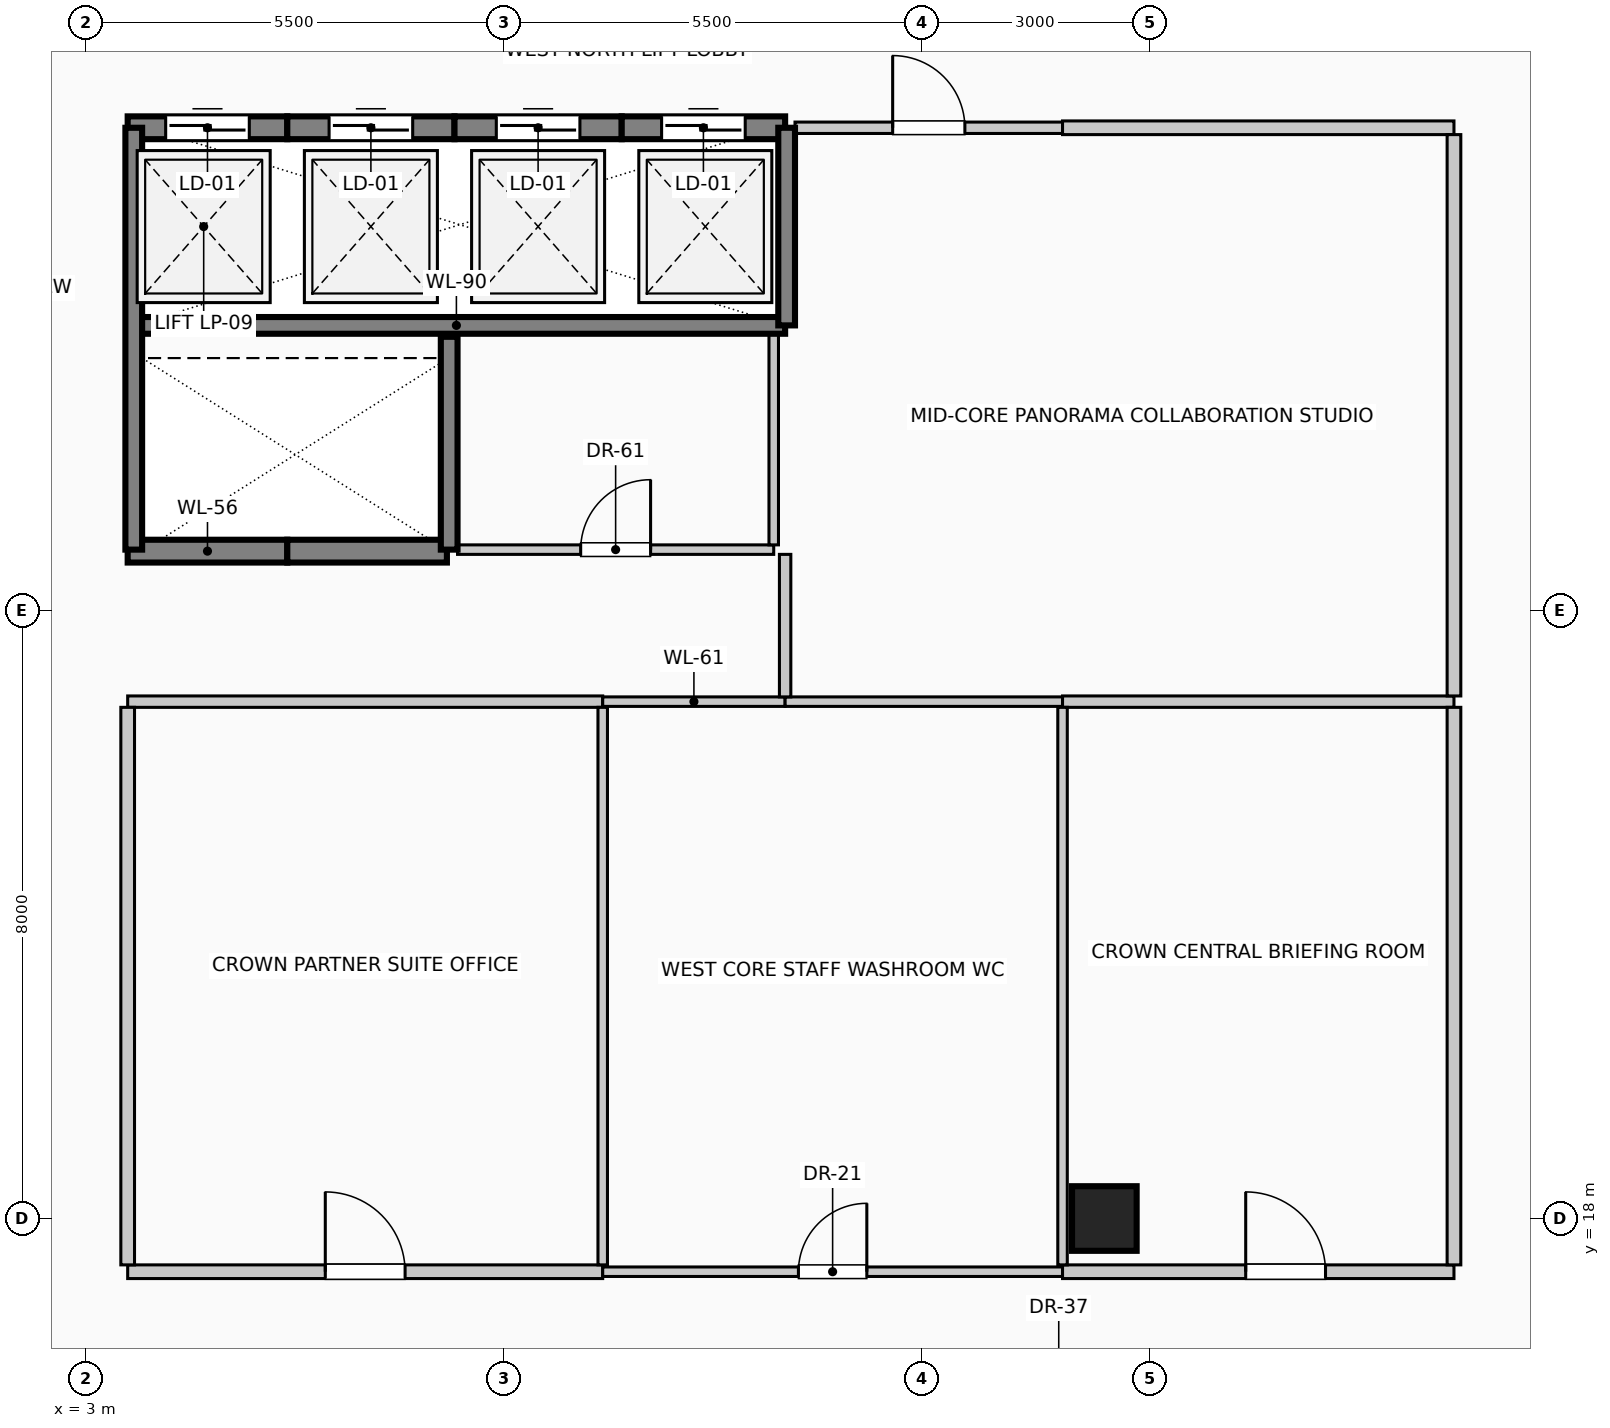
"""IFC4 building model, lengths in metres.
Left out: names, types, materials, properties, quantities, classifications, styles, units other than length and angle.
Written with IfcOpenShell. Run it as: python <this file> out.ifc"""

import sys

from ifc_helpers import new_model, si_unit, direction, frame, frame_2d, origin, origin_2d, place, context, subcontext, project, spatial, rectangle, circle, extrude, element, fill, save


model = new_model("IFC4")
c1 = context("Model", 3, precision=1e-05, world=origin(), true_north=direction((0.0, 1.0)))
c2 = subcontext(c1, "Body", "Model", "MODEL_VIEW")
j1 = project(units=[si_unit("LENGTHUNIT", "METRE"), si_unit("PLANEANGLEUNIT", "RADIAN")], contexts=[c1])
p1 = place(None, origin())
s1 = spatial("IfcSite", under=j1, at=p1, CompositionType="ELEMENT")
p2 = place(p1, origin())
s2 = spatial("IfcBuilding", under=s1, at=p2, CompositionType="ELEMENT")
p3 = place(p2, frame((0.0, 0.0, 301.0)))
s3 = spatial("IfcBuildingStorey", under=s2, at=p3, CompositionType="ELEMENT", Elevation=301.0)
p4 = place(p3, frame((16.4, 18.0, 0.0), z_axis=(0.0, 0.0, 1.0), x_axis=(1.0, 0.0, 0.0)))
e1 = element("IfcColumn", 1, at=p4, inside=s3, PredefinedType="COLUMN", context=c2, shape_type="SweptSolid", body=[
    extrude(circle(Radius=0.425, at=origin_2d()), origin(), (0.0, 0.0, 1.0), 4.0),
])
p5 = place(p3, frame((3.55, 32.35, 0.0), z_axis=(0.0, 0.0, 1.0), x_axis=(1.0, 0.0, 0.0)))
e2 = element("IfcWall", 2, at=p5, inside=s3, PredefinedType="SOLIDWALL", context=c2, shape_type="SweptSolid", body=[
    extrude(rectangle(XDim=2.1, YDim=0.3, at=frame_2d((1.05, 0.0))), origin(), (0.0, 0.0, 1.0), 4.0),
])
p6 = place(p5, frame((0.5, 0.0, 0.0)))
e3 = element("IfcOpeningElement", 3, at=p6, cuts=e2, PredefinedType="OPENING", context=c2, shape_type="SweptSolid", body=[
    extrude(rectangle(XDim=1.1, YDim=2.2, at=frame_2d((0.55, 1.1))), frame((0.0, 0.16, 0.0), z_axis=(0.0, -1.0, 0.0), x_axis=(1.0, 0.0, 0.0)), (0.0, 0.0, 1.0), 0.32),
])
p7 = place(p3, frame((5.65, 32.35, 0.0), z_axis=(0.0, 0.0, 1.0), x_axis=(1.0, 0.0, 0.0)))
e4 = element("IfcWall", 4, at=p7, inside=s3, PredefinedType="SOLIDWALL", context=c2, shape_type="SweptSolid", body=[
    extrude(rectangle(XDim=2.2, YDim=0.3, at=frame_2d((1.1, 0.0))), origin(), (0.0, 0.0, 1.0), 4.0),
])
p8 = place(p7, frame((0.55, 0.0, 0.0)))
e5 = element("IfcOpeningElement", 5, at=p8, cuts=e4, PredefinedType="OPENING", context=c2, shape_type="SweptSolid", body=[
    extrude(rectangle(XDim=1.1, YDim=2.2, at=frame_2d((0.55, 1.1))), frame((0.0, 0.16, 0.0), z_axis=(0.0, -1.0, 0.0), x_axis=(1.0, 0.0, 0.0)), (0.0, 0.0, 1.0), 0.32),
])
p9 = place(p3, frame((7.85, 32.35, 0.0), z_axis=(0.0, 0.0, 1.0), x_axis=(1.0, 0.0, 0.0)))
e6 = element("IfcWall", 6, at=p9, inside=s3, PredefinedType="SOLIDWALL", context=c2, shape_type="SweptSolid", body=[
    extrude(rectangle(XDim=2.2, YDim=0.3, at=frame_2d((1.1, 0.0))), origin(), (0.0, 0.0, 1.0), 4.0),
])
p10 = place(p9, frame((0.55, 0.0, 0.0)))
e7 = element("IfcOpeningElement", 7, at=p10, cuts=e6, PredefinedType="OPENING", context=c2, shape_type="SweptSolid", body=[
    extrude(rectangle(XDim=1.1, YDim=2.2, at=frame_2d((0.55, 1.1))), frame((0.0, 0.16, 0.0), z_axis=(0.0, -1.0, 0.0), x_axis=(1.0, 0.0, 0.0)), (0.0, 0.0, 1.0), 0.32),
])
p11 = place(p3, frame((10.05, 32.35, 0.0), z_axis=(0.0, 0.0, 1.0), x_axis=(1.0, 0.0, 0.0)))
e8 = element("IfcWall", 8, at=p11, inside=s3, PredefinedType="SOLIDWALL", context=c2, shape_type="SweptSolid", body=[
    extrude(rectangle(XDim=2.15, YDim=0.3, at=frame_2d((1.075, 0.0))), origin(), (0.0, 0.0, 1.0), 4.0),
])
p12 = place(p11, frame((0.525, 0.0, 0.0)))
e9 = element("IfcOpeningElement", 9, at=p12, cuts=e8, PredefinedType="OPENING", context=c2, shape_type="SweptSolid", body=[
    extrude(rectangle(XDim=1.1, YDim=2.2, at=frame_2d((0.55, 1.1))), frame((0.0, 0.16, 0.0), z_axis=(0.0, -1.0, 0.0), x_axis=(1.0, 0.0, 0.0)), (0.0, 0.0, 1.0), 0.32),
])
p13 = place(p3, frame((5.65, 26.78, 0.0), z_axis=(0.0, 0.0, 1.0), x_axis=(-1.0, 0.0, 0.0)))
e10 = element("IfcWall", 10, at=p13, inside=s3, PredefinedType="SOLIDWALL", context=c2, shape_type="SweptSolid", body=[
    extrude(rectangle(XDim=2.1, YDim=0.3, at=frame_2d((1.05, 0.0))), origin(), (0.0, 0.0, 1.0), 4.0),
])
p14 = place(p3, frame((7.75, 26.78, 0.0), z_axis=(0.0, 0.0, 1.0), x_axis=(-1.0, 0.0, 0.0)))
e11 = element("IfcWall", 11, at=p14, inside=s3, PredefinedType="SOLIDWALL", context=c2, shape_type="SweptSolid", body=[
    extrude(rectangle(XDim=2.1, YDim=0.3, at=frame_2d((1.05, 0.0))), origin(), (0.0, 0.0, 1.0), 4.0),
])
p15 = place(p3, frame((3.55, 29.75, 0.0), z_axis=(0.0, 0.0, 1.0), x_axis=(1.0, 0.0, 0.0)))
e12 = element("IfcWall", 12, at=p15, inside=s3, PredefinedType="SOLIDWALL", context=c2, shape_type="SweptSolid", body=[
    extrude(rectangle(XDim=8.65, YDim=0.22, at=frame_2d((4.325, 0.0))), origin(), (0.0, 0.0, 1.0), 4.0),
])
p16 = place(p3, frame((3.63, 26.8, 0.0), z_axis=(0.0, 0.0, 1.0), x_axis=(0.0, 1.0, 0.0)))
e13 = element("IfcWall", 13, at=p16, inside=s3, PredefinedType="SOLIDWALL", context=c2, shape_type="SweptSolid", body=[
    extrude(rectangle(XDim=5.55, YDim=0.22, at=frame_2d((2.775, 0.0))), origin(), (0.0, 0.0, 1.0), 4.0),
])
p17 = place(p3, frame((7.78, 26.8, 0.0), z_axis=(0.0, 0.0, 1.0), x_axis=(0.0, 1.0, 0.0)))
e14 = element("IfcWall", 14, at=p17, inside=s3, PredefinedType="SOLIDWALL", context=c2, shape_type="SweptSolid", body=[
    extrude(rectangle(XDim=2.8, YDim=0.22, at=frame_2d((1.4, 0.0))), origin(), (0.0, 0.0, 1.0), 4.0),
])
p18 = place(p3, frame((12.22, 29.75, 0.0), z_axis=(0.0, 0.0, 1.0), x_axis=(0.0, 1.0, 0.0)))
e15 = element("IfcWall", 15, at=p18, inside=s3, PredefinedType="SOLIDWALL", context=c2, shape_type="SweptSolid", body=[
    extrude(rectangle(XDim=2.6, YDim=0.22, at=frame_2d((1.3, 0.0))), origin(), (0.0, 0.0, 1.0), 4.0),
])
p19 = place(p3, frame((3.55, 17.3, 0.0), z_axis=(0.0, 0.0, 1.0), x_axis=(1.0, 0.0, 0.0)))
e16 = element("IfcWall", 16, at=p19, inside=s3, PredefinedType="PARTITIONING", context=c2, shape_type="SweptSolid", body=[
    extrude(rectangle(XDim=6.25, YDim=0.18, at=frame_2d((3.125, 0.0))), origin(), (0.0, 0.0, 1.0), 3.775),
])
p20 = place(p19, frame((2.6, 0.0, 0.0)))
e17 = element("IfcOpeningElement", 17, at=p20, cuts=e16, PredefinedType="OPENING", context=c2, shape_type="SweptSolid", body=[
    extrude(rectangle(XDim=1.05, YDim=2.15, at=frame_2d((0.525, 1.075))), frame((0.0, 0.1, 0.0), z_axis=(0.0, -1.0, 0.0), x_axis=(1.0, 0.0, 0.0)), (0.0, 0.0, 1.0), 0.2),
])
p21 = place(p3, frame((9.8, 17.3, 0.0), z_axis=(0.0, 0.0, 1.0), x_axis=(1.0, 0.0, 0.0)))
e18 = element("IfcWall", 18, at=p21, inside=s3, PredefinedType="PARTITIONING", context=c2, shape_type="SweptSolid", body=[
    extrude(rectangle(XDim=6.05, YDim=0.125, at=frame_2d((3.025, 0.0))), origin(), (0.0, 0.0, 1.0), 3.775),
])
p22 = place(p21, frame((2.575, 0.0, 0.0)))
e19 = element("IfcOpeningElement", 19, at=p22, cuts=e18, PredefinedType="OPENING", context=c2, shape_type="SweptSolid", body=[
    extrude(rectangle(XDim=0.9, YDim=2.1, at=frame_2d((0.45, 1.05))), frame((0.0, 0.073, 0.0), z_axis=(0.0, -1.0, 0.0), x_axis=(1.0, 0.0, 0.0)), (0.0, 0.0, 1.0), 0.145),
])
p23 = place(p3, frame((15.85, 17.3, 0.0), z_axis=(0.0, 0.0, 1.0), x_axis=(1.0, 0.0, 0.0)))
e20 = element("IfcWall", 20, at=p23, inside=s3, PredefinedType="PARTITIONING", context=c2, shape_type="SweptSolid", body=[
    extrude(rectangle(XDim=5.15, YDim=0.18, at=frame_2d((2.575, 0.0))), origin(), (0.0, 0.0, 1.0), 3.775),
])
p24 = place(p23, frame((2.41, 0.0, 0.0)))
e21 = element("IfcOpeningElement", 21, at=p24, cuts=e20, PredefinedType="OPENING", context=c2, shape_type="SweptSolid", body=[
    extrude(rectangle(XDim=1.05, YDim=2.15, at=frame_2d((0.525, 1.075))), frame((0.0, 0.1, 0.0), z_axis=(0.0, -1.0, 0.0), x_axis=(1.0, 0.0, 0.0)), (0.0, 0.0, 1.0), 0.2),
])
p25 = place(p3, frame((3.55, 24.8, 0.0), z_axis=(0.0, 0.0, 1.0), x_axis=(1.0, 0.0, 0.0)))
e22 = element("IfcWall", 22, at=p25, inside=s3, PredefinedType="PARTITIONING", context=c2, shape_type="SweptSolid", body=[
    extrude(rectangle(XDim=6.25, YDim=0.15, at=frame_2d((3.125, 0.0))), origin(), (0.0, 0.0, 1.0), 3.775),
])
p26 = place(p3, frame((9.8, 24.8, 0.0), z_axis=(0.0, 0.0, 1.0), x_axis=(1.0, 0.0, 0.0)))
e23 = element("IfcWall", 23, at=p26, inside=s3, PredefinedType="PARTITIONING", context=c2, shape_type="SweptSolid", body=[
    extrude(rectangle(XDim=2.4, YDim=0.125, at=frame_2d((1.2, 0.0))), origin(), (0.0, 0.0, 1.0), 3.775),
])
p27 = place(p3, frame((12.2, 24.8, 0.0), z_axis=(0.0, 0.0, 1.0), x_axis=(1.0, 0.0, 0.0)))
e24 = element("IfcWall", 24, at=p27, inside=s3, PredefinedType="PARTITIONING", context=c2, shape_type="SweptSolid", body=[
    extrude(rectangle(XDim=3.65, YDim=0.125, at=frame_2d((1.825, 0.0))), origin(), (0.0, 0.0, 1.0), 3.775),
])
p28 = place(p3, frame((15.85, 24.8, 0.0), z_axis=(0.0, 0.0, 1.0), x_axis=(1.0, 0.0, 0.0)))
e25 = element("IfcWall", 25, at=p28, inside=s3, PredefinedType="PARTITIONING", context=c2, shape_type="SweptSolid", body=[
    extrude(rectangle(XDim=5.15, YDim=0.15, at=frame_2d((2.575, 0.0))), origin(), (0.0, 0.0, 1.0), 3.775),
])
p29 = place(p3, frame((7.89, 26.8, 0.0), z_axis=(0.0, 0.0, 1.0), x_axis=(1.0, 0.0, 0.0)))
e26 = element("IfcWall", 26, at=p29, inside=s3, PredefinedType="PARTITIONING", context=c2, shape_type="SweptSolid", body=[
    extrude(rectangle(XDim=4.16, YDim=0.125, at=frame_2d((2.08, 0.0))), origin(), (0.0, 0.0, 1.0), 3.775),
])
p30 = place(p29, frame((1.62, 0.0, 0.0)))
e27 = element("IfcOpeningElement", 27, at=p30, cuts=e26, PredefinedType="OPENING", context=c2, shape_type="SweptSolid", body=[
    extrude(rectangle(XDim=0.92, YDim=2.1, at=frame_2d((0.46, 1.05))), frame((0.0, 0.073, 0.0), z_axis=(0.0, -1.0, 0.0), x_axis=(1.0, 0.0, 0.0)), (0.0, 0.0, 1.0), 0.145),
])
p31 = place(p3, frame((12.33, 32.35, 0.0), z_axis=(0.0, 0.0, 1.0), x_axis=(1.0, 0.0, 0.0)))
e28 = element("IfcWall", 28, at=p31, inside=s3, PredefinedType="PARTITIONING", context=c2, shape_type="SweptSolid", body=[
    extrude(rectangle(XDim=3.52, YDim=0.15, at=frame_2d((1.76, 0.0))), origin(), (0.0, 0.0, 1.0), 3.775),
])
p32 = place(p31, frame((1.285, 0.0, 0.0)))
e29 = element("IfcOpeningElement", 29, at=p32, cuts=e28, PredefinedType="OPENING", context=c2, shape_type="SweptSolid", body=[
    extrude(rectangle(XDim=0.95, YDim=2.15, at=frame_2d((0.475, 1.075))), frame((0.0, 0.085, 0.0), z_axis=(0.0, -1.0, 0.0), x_axis=(1.0, 0.0, 0.0)), (0.0, 0.0, 1.0), 0.17),
])
p33 = place(p3, frame((15.85, 32.35, 0.0), z_axis=(0.0, 0.0, 1.0), x_axis=(1.0, 0.0, 0.0)))
e30 = element("IfcWall", 30, at=p33, inside=s3, PredefinedType="PARTITIONING", context=c2, shape_type="SweptSolid", body=[
    extrude(rectangle(XDim=5.15, YDim=0.18, at=frame_2d((2.575, 0.0))), origin(), (0.0, 0.0, 1.0), 3.775),
])
p34 = place(p3, frame((3.55, 17.39, 0.0), z_axis=(0.0, 0.0, 1.0), x_axis=(0.0, 1.0, 0.0)))
e31 = element("IfcWall", 31, at=p34, inside=s3, PredefinedType="PARTITIONING", context=c2, shape_type="SweptSolid", body=[
    extrude(rectangle(XDim=7.335, YDim=0.18, at=frame_2d((3.667, 0.0))), origin(), (0.0, 0.0, 1.0), 3.775),
])
p35 = place(p3, frame((9.8, 17.39, 0.0), z_axis=(0.0, 0.0, 1.0), x_axis=(0.0, 1.0, 0.0)))
e32 = element("IfcWall", 32, at=p35, inside=s3, PredefinedType="PARTITIONING", context=c2, shape_type="SweptSolid", body=[
    extrude(rectangle(XDim=7.335, YDim=0.125, at=frame_2d((3.667, 0.0))), origin(), (0.0, 0.0, 1.0), 3.775),
])
p36 = place(p3, frame((12.05, 26.863, 0.0), z_axis=(0.0, 0.0, 1.0), x_axis=(0.0, 1.0, 0.0)))
e33 = element("IfcWall", 33, at=p36, inside=s3, PredefinedType="PARTITIONING", context=c2, shape_type="SweptSolid", body=[
    extrude(rectangle(XDim=2.777, YDim=0.125, at=frame_2d((1.389, 0.0))), origin(), (0.0, 0.0, 1.0), 3.775),
])
p37 = place(p3, frame((12.2, 24.863, 0.0), z_axis=(0.0, 0.0, 1.0), x_axis=(0.0, 1.0, 0.0)))
e34 = element("IfcWall", 34, at=p37, inside=s3, PredefinedType="PARTITIONING", context=c2, shape_type="SweptSolid", body=[
    extrude(rectangle(XDim=1.875, YDim=0.15, at=frame_2d((0.938, 0.0))), origin(), (0.0, 0.0, 1.0), 3.775),
])
p38 = place(p3, frame((15.85, 17.39, 0.0), z_axis=(0.0, 0.0, 1.0), x_axis=(0.0, 1.0, 0.0)))
e35 = element("IfcWall", 35, at=p38, inside=s3, PredefinedType="PARTITIONING", context=c2, shape_type="SweptSolid", body=[
    extrude(rectangle(XDim=7.335, YDim=0.125, at=frame_2d((3.667, 0.0))), origin(), (0.0, 0.0, 1.0), 3.775),
])
p39 = place(p3, frame((21.0, 17.39, 0.0), z_axis=(0.0, 0.0, 1.0), x_axis=(0.0, 1.0, 0.0)))
e36 = element("IfcWall", 36, at=p39, inside=s3, PredefinedType="PARTITIONING", context=c2, shape_type="SweptSolid", body=[
    extrude(rectangle(XDim=7.335, YDim=0.18, at=frame_2d((3.667, 0.0))), origin(), (0.0, 0.0, 1.0), 3.775),
])
p40 = place(p3, frame((21.0, 24.875, 0.0), z_axis=(0.0, 0.0, 1.0), x_axis=(0.0, 1.0, 0.0)))
e37 = element("IfcWall", 37, at=p40, inside=s3, PredefinedType="PARTITIONING", context=c2, shape_type="SweptSolid", body=[
    extrude(rectangle(XDim=7.385, YDim=0.18, at=frame_2d((3.692, 0.0))), origin(), (0.0, 0.0, 1.0), 3.775),
])
p41 = place(p6, origin())
e38 = element("IfcDoor", 38, at=p41, inside=s3, OperationType="SLIDING_TO_LEFT", PredefinedType="DOOR", context=c2, shape_type="SweptSolid", body=[
    extrude(rectangle(XDim=1.1, YDim=2.2, at=frame_2d((0.55, 1.1))), frame((0.0, 0.025, 0.0), z_axis=(0.0, -1.0, 0.0), x_axis=(1.0, 0.0, 0.0)), (0.0, 0.0, 1.0), 0.05),
])
fill(e3, e38)
p42 = place(p8, origin())
e39 = element("IfcDoor", 39, at=p42, inside=s3, OperationType="SLIDING_TO_RIGHT", PredefinedType="DOOR", context=c2, shape_type="SweptSolid", body=[
    extrude(rectangle(XDim=1.1, YDim=2.2, at=frame_2d((0.55, 1.1))), frame((0.0, 0.025, 0.0), z_axis=(0.0, -1.0, 0.0), x_axis=(1.0, 0.0, 0.0)), (0.0, 0.0, 1.0), 0.05),
])
fill(e5, e39)
p43 = place(p10, origin())
e40 = element("IfcDoor", 40, at=p43, inside=s3, OperationType="SLIDING_TO_LEFT", PredefinedType="DOOR", context=c2, shape_type="SweptSolid", body=[
    extrude(rectangle(XDim=1.1, YDim=2.2, at=frame_2d((0.55, 1.1))), frame((0.0, 0.025, 0.0), z_axis=(0.0, -1.0, 0.0), x_axis=(1.0, 0.0, 0.0)), (0.0, 0.0, 1.0), 0.05),
])
fill(e7, e40)
p44 = place(p12, origin())
e41 = element("IfcDoor", 41, at=p44, inside=s3, OperationType="SLIDING_TO_RIGHT", PredefinedType="DOOR", context=c2, shape_type="SweptSolid", body=[
    extrude(rectangle(XDim=1.1, YDim=2.2, at=frame_2d((0.55, 1.1))), frame((0.0, 0.025, 0.0), z_axis=(0.0, -1.0, 0.0), x_axis=(1.0, 0.0, 0.0)), (0.0, 0.0, 1.0), 0.05),
])
fill(e9, e41)
p45 = place(p20, origin())
e42 = element("IfcDoor", 42, at=p45, inside=s3, OperationType="SINGLE_SWING_LEFT", PredefinedType="DOOR", context=c2, shape_type="SweptSolid", body=[
    extrude(rectangle(XDim=1.05, YDim=2.15, at=frame_2d((0.525, 1.075))), frame((0.0, 0.025, 0.0), z_axis=(0.0, -1.0, 0.0), x_axis=(1.0, 0.0, 0.0)), (0.0, 0.0, 1.0), 0.05),
])
fill(e17, e42)
p46 = place(p22, origin())
e43 = element("IfcDoor", 43, at=p46, inside=s3, OperationType="SINGLE_SWING_RIGHT", PredefinedType="DOOR", context=c2, shape_type="SweptSolid", body=[
    extrude(rectangle(XDim=0.9, YDim=2.1, at=frame_2d((0.45, 1.05))), frame((0.0, 0.025, 0.0), z_axis=(0.0, -1.0, 0.0), x_axis=(1.0, 0.0, 0.0)), (0.0, 0.0, 1.0), 0.05),
])
fill(e19, e43)
p47 = place(p24, origin())
e44 = element("IfcDoor", 44, at=p47, inside=s3, OperationType="SINGLE_SWING_LEFT", PredefinedType="DOOR", context=c2, shape_type="SweptSolid", body=[
    extrude(rectangle(XDim=1.05, YDim=2.15, at=frame_2d((0.525, 1.075))), frame((0.0, 0.025, 0.0), z_axis=(0.0, -1.0, 0.0), x_axis=(1.0, 0.0, 0.0)), (0.0, 0.0, 1.0), 0.05),
])
fill(e21, e44)
p48 = place(p30, origin())
e45 = element("IfcDoor", 45, at=p48, inside=s3, OperationType="SINGLE_SWING_RIGHT", PredefinedType="DOOR", context=c2, shape_type="SweptSolid", body=[
    extrude(rectangle(XDim=0.92, YDim=2.1, at=frame_2d((0.46, 1.05))), frame((0.0, 0.025, 0.0), z_axis=(0.0, -1.0, 0.0), x_axis=(1.0, 0.0, 0.0)), (0.0, 0.0, 1.0), 0.05),
])
fill(e27, e45)
p49 = place(p32, origin())
e46 = element("IfcDoor", 46, at=p49, inside=s3, OperationType="SINGLE_SWING_LEFT", PredefinedType="DOOR", context=c2, shape_type="SweptSolid", body=[
    extrude(rectangle(XDim=0.95, YDim=2.15, at=frame_2d((0.475, 1.075))), frame((0.0, 0.025, 0.0), z_axis=(0.0, -1.0, 0.0), x_axis=(1.0, 0.0, 0.0)), (0.0, 0.0, 1.0), 0.05),
])
fill(e29, e46)
save(model, sys.argv[1])
